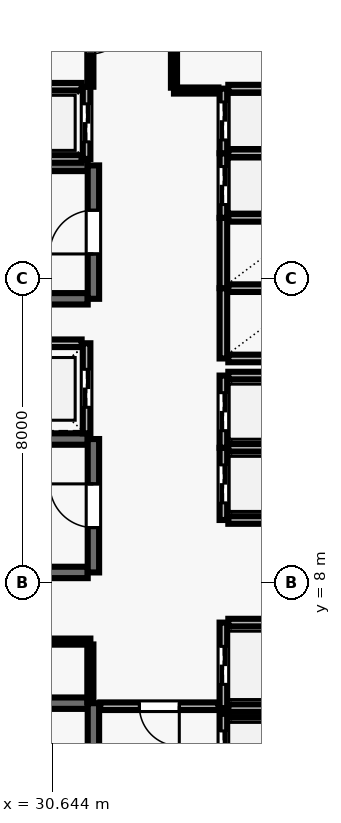
"""IFC4 building model, lengths in metres.
Left out: names, types, materials, properties, quantities, classifications, styles, units other than length and angle.
Written with IfcOpenShell. Run it as: python <this file> out.ifc"""

import sys

from ifc_helpers import new_model, si_unit, direction, frame, frame_2d, origin, place, context, subcontext, project, spatial, rectangle, extrude, element, fill, save


model = new_model("IFC4")
c1 = context("Model", 3, precision=1e-05, world=origin(), true_north=direction((0.0, 1.0)))
c2 = subcontext(c1, "Body", "Model", "MODEL_VIEW")
j1 = project(units=[si_unit("LENGTHUNIT", "METRE"), si_unit("PLANEANGLEUNIT", "RADIAN")], contexts=[c1])
p1 = place(None, origin())
s1 = spatial("IfcSite", under=j1, at=p1, CompositionType="ELEMENT")
p2 = place(p1, origin())
s2 = spatial("IfcBuilding", under=s1, at=p2, CompositionType="ELEMENT")
p3 = place(p2, frame((0.0, 0.0, 170.8)))
s3 = spatial("IfcBuildingStorey", under=s2, at=p3, CompositionType="ELEMENT", Elevation=170.8)
p4 = place(p3, frame((31.58, 4.83, 0.0), z_axis=(0.0, 0.0, 1.0), x_axis=(-1.0, 0.0, 0.0)))
e1 = element("IfcWall", 1, at=p4, inside=s3, PredefinedType="SHEAR", context=c2, shape_type="SweptSolid", body=[
    extrude(rectangle(XDim=8.36, YDim=0.3, at=frame_2d((4.18, 0.0))), origin(), (0.0, 0.0, 1.0), 4.79),
])
p5 = place(p3, frame((31.73, 0.96, 0.0), z_axis=(0.0, 0.0, 1.0), x_axis=(0.0, 1.0, 0.0)))
e2 = element("IfcWall", 2, at=p5, inside=s3, PredefinedType="SHEAR", context=c2, shape_type="SweptSolid", body=[
    extrude(rectangle(XDim=3.87, YDim=0.3, at=frame_2d((1.935, 0.0))), origin(), (0.0, 0.0, 1.0), 4.79),
])
p6 = place(p5, frame((1.54, 0.0, 0.0)))
e3 = element("IfcOpeningElement", 3, at=p6, cuts=e2, PredefinedType="OPENING", context=c2, shape_type="SweptSolid", body=[
    extrude(rectangle(XDim=1.15, YDim=2.15, at=frame_2d((0.575, 1.075))), frame((0.0, 0.16, 0.0), z_axis=(0.0, -1.0, 0.0), x_axis=(1.0, 0.0, 0.0)), (0.0, 0.0, 1.0), 0.32),
])
for number, where, z_axis, x_axis in (
    (4, (31.58, 18.98, 0.0), (0.0, 0.0, 1.0), (-1.0, 0.0, 0.0)),
    (5, (23.22, 15.47, 0.0), (0.0, 0.0, 1.0), (1.0, 0.0, 0.0)),
):
    element("IfcWall", number, at=place(p3, frame(where, z_axis=z_axis, x_axis=x_axis)), inside=s3, PredefinedType="SHEAR", context=c2, shape_type="SweptSolid", body=[
        extrude(rectangle(XDim=8.36, YDim=0.3, at=frame_2d((4.18, 0.0))), origin(), (0.0, 0.0, 1.0), 4.79),
    ])
p7 = place(p3, frame((31.73, 15.47, 0.0), z_axis=(0.0, 0.0, 1.0), x_axis=(0.0, 1.0, 0.0)))
e6 = element("IfcWall", 6, at=p7, inside=s3, PredefinedType="SHEAR", context=c2, shape_type="SweptSolid", body=[
    extrude(rectangle(XDim=3.51, YDim=0.3, at=frame_2d((1.755, 0.0))), origin(), (0.0, 0.0, 1.0), 4.79),
])
p8 = place(p7, frame((1.18, 0.0, 0.0)))
e7 = element("IfcOpeningElement", 7, at=p8, cuts=e6, PredefinedType="OPENING", context=c2, shape_type="SweptSolid", body=[
    extrude(rectangle(XDim=1.15, YDim=2.15, at=frame_2d((0.575, 1.075))), frame((0.0, 0.16, 0.0), z_axis=(0.0, -1.0, 0.0), x_axis=(1.0, 0.0, 0.0)), (0.0, 0.0, 1.0), 0.32),
])
for number, where, z_axis, x_axis in (
    (8, (31.58, 11.78, 0.0), (0.0, 0.0, 1.0), (-1.0, 0.0, 0.0)),
    (9, (23.22, 8.27, 0.0), (0.0, 0.0, 1.0), (1.0, 0.0, 0.0)),
):
    element("IfcWall", number, at=place(p3, frame(where, z_axis=z_axis, x_axis=x_axis)), inside=s3, PredefinedType="SHEAR", context=c2, shape_type="SweptSolid", body=[
        extrude(rectangle(XDim=8.36, YDim=0.3, at=frame_2d((4.18, 0.0))), origin(), (0.0, 0.0, 1.0), 4.79),
    ])
p9 = place(p3, frame((31.73, 8.27, 0.0), z_axis=(0.0, 0.0, 1.0), x_axis=(0.0, 1.0, 0.0)))
e10 = element("IfcWall", 10, at=p9, inside=s3, PredefinedType="SHEAR", context=c2, shape_type="SweptSolid", body=[
    extrude(rectangle(XDim=3.51, YDim=0.3, at=frame_2d((1.755, 0.0))), origin(), (0.0, 0.0, 1.0), 4.79),
])
p10 = place(p9, frame((1.18, 0.0, 0.0)))
e11 = element("IfcOpeningElement", 11, at=p10, cuts=e10, PredefinedType="OPENING", context=c2, shape_type="SweptSolid", body=[
    extrude(rectangle(XDim=1.15, YDim=2.15, at=frame_2d((0.575, 1.075))), frame((0.0, 0.16, 0.0), z_axis=(0.0, -1.0, 0.0), x_axis=(1.0, 0.0, 0.0)), (0.0, 0.0, 1.0), 0.32),
])
p11 = place(p3, frame((35.15, 4.55, 0.0), z_axis=(0.0, 0.0, 1.0), x_axis=(0.0, -1.0, 0.0)))
e12 = element("IfcWall", 12, at=p11, inside=s3, PredefinedType="SOLIDWALL", context=c2, shape_type="SweptSolid", body=[
    extrude(rectangle(XDim=2.1, YDim=0.2, at=frame_2d((1.05, 0.0))), origin(), (0.0, 0.0, 1.0), 4.79),
])
p12 = place(p11, frame((0.45, 0.0, 0.0)))
e13 = element("IfcOpeningElement", 13, at=p12, cuts=e12, PredefinedType="OPENING", context=c2, shape_type="SweptSolid", body=[
    extrude(rectangle(XDim=1.2, YDim=2.15, at=frame_2d((0.6, 1.075))), frame((0.0, 0.11, 0.0), z_axis=(0.0, -1.0, 0.0), x_axis=(1.0, 0.0, 0.0)), (0.0, 0.0, 1.0), 0.22),
])
p13 = place(p3, frame((37.42, 4.55, 0.0), z_axis=(0.0, 0.0, 1.0), x_axis=(-1.0, 0.0, 0.0)))
e14 = element("IfcWall", 14, at=p13, inside=s3, PredefinedType="SOLIDWALL", context=c2, shape_type="SweptSolid", body=[
    extrude(rectangle(XDim=2.14, YDim=0.2, at=frame_2d((1.07, 0.0))), origin(), (0.0, 0.0, 1.0), 4.79),
])
p14 = place(p3, frame((35.15, 6.95, 0.0), z_axis=(0.0, 0.0, 1.0), x_axis=(0.0, -1.0, 0.0)))
e15 = element("IfcWall", 15, at=p14, inside=s3, PredefinedType="SOLIDWALL", context=c2, shape_type="SweptSolid", body=[
    extrude(rectangle(XDim=2.25, YDim=0.2, at=frame_2d((1.125, 0.0))), origin(), (0.0, 0.0, 1.0), 4.79),
])
p15 = place(p14, frame((0.625, 0.0, 0.0)))
e16 = element("IfcOpeningElement", 16, at=p15, cuts=e15, PredefinedType="OPENING", context=c2, shape_type="SweptSolid", body=[
    extrude(rectangle(XDim=1.0, YDim=2.1, at=frame_2d((0.5, 1.05))), frame((0.0, 0.11, 0.0), z_axis=(0.0, -1.0, 0.0), x_axis=(1.0, 0.0, 0.0)), (0.0, 0.0, 1.0), 0.22),
])
for number, where, z_axis, x_axis in (
    (17, (35.28, 4.7, 0.0), (0.0, 0.0, 1.0), (1.0, 0.0, 0.0)),
    (18, (37.42, 6.95, 0.0), (0.0, 0.0, 1.0), (-1.0, 0.0, 0.0)),
):
    element("IfcWall", number, at=place(p3, frame(where, z_axis=z_axis, x_axis=x_axis)), inside=s3, PredefinedType="SOLIDWALL", context=c2, shape_type="SweptSolid", body=[
        extrude(rectangle(XDim=2.14, YDim=0.2, at=frame_2d((1.07, 0.0))), origin(), (0.0, 0.0, 1.0), 4.79),
    ])
p16 = place(p3, frame((35.15, 11.55, 0.0), z_axis=(0.0, 0.0, 1.0), x_axis=(0.0, -1.0, 0.0)))
e19 = element("IfcWall", 19, at=p16, inside=s3, PredefinedType="SOLIDWALL", context=c2, shape_type="SweptSolid", body=[
    extrude(rectangle(XDim=1.9, YDim=0.2, at=frame_2d((0.95, 0.0))), origin(), (0.0, 0.0, 1.0), 4.79),
])
p17 = place(p16, frame((0.45, 0.0, 0.0)))
e20 = element("IfcOpeningElement", 20, at=p17, cuts=e19, PredefinedType="OPENING", context=c2, shape_type="SweptSolid", body=[
    extrude(rectangle(XDim=1.0, YDim=2.1, at=frame_2d((0.5, 1.05))), frame((0.0, 0.11, 0.0), z_axis=(0.0, -1.0, 0.0), x_axis=(1.0, 0.0, 0.0)), (0.0, 0.0, 1.0), 0.22),
])
for number, where, z_axis, x_axis in (
    (21, (35.28, 9.65, 0.0), (0.0, 0.0, 1.0), (1.0, 0.0, 0.0)),
    (22, (37.42, 11.55, 0.0), (0.0, 0.0, 1.0), (-1.0, 0.0, 0.0)),
):
    element("IfcWall", number, at=place(p3, frame(where, z_axis=z_axis, x_axis=x_axis)), inside=s3, PredefinedType="SOLIDWALL", context=c2, shape_type="SweptSolid", body=[
        extrude(rectangle(XDim=2.14, YDim=0.2, at=frame_2d((1.07, 0.0))), origin(), (0.0, 0.0, 1.0), 4.79),
    ])
p18 = place(p3, frame((35.15, 13.45, 0.0), z_axis=(0.0, 0.0, 1.0), x_axis=(0.0, -1.0, 0.0)))
e23 = element("IfcWall", 23, at=p18, inside=s3, PredefinedType="SOLIDWALL", context=c2, shape_type="SweptSolid", body=[
    extrude(rectangle(XDim=1.9, YDim=0.2, at=frame_2d((0.95, 0.0))), origin(), (0.0, 0.0, 1.0), 4.79),
])
p19 = place(p18, frame((0.45, 0.0, 0.0)))
e24 = element("IfcOpeningElement", 24, at=p19, cuts=e23, PredefinedType="OPENING", context=c2, shape_type="SweptSolid", body=[
    extrude(rectangle(XDim=1.0, YDim=2.1, at=frame_2d((0.5, 1.05))), frame((0.0, 0.11, 0.0), z_axis=(0.0, -1.0, 0.0), x_axis=(1.0, 0.0, 0.0)), (0.0, 0.0, 1.0), 0.22),
])
p20 = place(p3, frame((37.42, 13.45, 0.0), z_axis=(0.0, 0.0, 1.0), x_axis=(-1.0, 0.0, 0.0)))
e25 = element("IfcWall", 25, at=p20, inside=s3, PredefinedType="SOLIDWALL", context=c2, shape_type="SweptSolid", body=[
    extrude(rectangle(XDim=2.14, YDim=0.2, at=frame_2d((1.07, 0.0))), origin(), (0.0, 0.0, 1.0), 4.79),
])
p21 = place(p3, frame((31.55, 11.93, 0.0), z_axis=(0.0, 0.0, 1.0), x_axis=(0.0, 1.0, 0.0)))
e26 = element("IfcWall", 26, at=p21, inside=s3, PredefinedType="SOLIDWALL", context=c2, shape_type="SweptSolid", body=[
    extrude(rectangle(XDim=2.37, YDim=0.2, at=frame_2d((1.185, 0.0))), origin(), (0.0, 0.0, 1.0), 4.79),
])
p22 = place(p21, frame((0.685, 0.0, 0.0)))
e27 = element("IfcOpeningElement", 27, at=p22, cuts=e26, PredefinedType="OPENING", context=c2, shape_type="SweptSolid", body=[
    extrude(rectangle(XDim=1.0, YDim=2.1, at=frame_2d((0.5, 1.05))), frame((0.0, 0.11, 0.0), z_axis=(0.0, -1.0, 0.0), x_axis=(1.0, 0.0, 0.0)), (0.0, 0.0, 1.0), 0.22),
])
p23 = place(p3, frame((31.42, 14.3, 0.0), z_axis=(0.0, 0.0, 1.0), x_axis=(-1.0, 0.0, 0.0)))
e28 = element("IfcWall", 28, at=p23, inside=s3, PredefinedType="SOLIDWALL", context=c2, shape_type="SweptSolid", body=[
    extrude(rectangle(XDim=2.44, YDim=0.2, at=frame_2d((1.22, 0.0))), origin(), (0.0, 0.0, 1.0), 4.79),
])
p24 = place(p3, frame((35.15, 15.75, 0.0), z_axis=(0.0, 0.0, 1.0), x_axis=(0.0, -1.0, 0.0)))
e29 = element("IfcWall", 29, at=p24, inside=s3, PredefinedType="SOLIDWALL", context=c2, shape_type="SweptSolid", body=[
    extrude(rectangle(XDim=1.85, YDim=0.2, at=frame_2d((0.925, 0.0))), origin(), (0.0, 0.0, 1.0), 4.79),
])
for number, where, z_axis, x_axis in (
    (30, (35.28, 13.9, 0.0), (0.0, 0.0, 1.0), (1.0, 0.0, 0.0)),
    (31, (37.42, 15.75, 0.0), (0.0, 0.0, 1.0), (-1.0, 0.0, 0.0)),
):
    element("IfcWall", number, at=place(p3, frame(where, z_axis=z_axis, x_axis=x_axis)), inside=s3, PredefinedType="SOLIDWALL", context=c2, shape_type="SweptSolid", body=[
        extrude(rectangle(XDim=2.14, YDim=0.2, at=frame_2d((1.07, 0.0))), origin(), (0.0, 0.0, 1.0), 4.79),
    ])
p25 = place(p3, frame((35.15, 17.6, 0.0), z_axis=(0.0, 0.0, 1.0), x_axis=(0.0, -1.0, 0.0)))
e32 = element("IfcWall", 32, at=p25, inside=s3, PredefinedType="SOLIDWALL", context=c2, shape_type="SweptSolid", body=[
    extrude(rectangle(XDim=1.85, YDim=0.2, at=frame_2d((0.925, 0.0))), origin(), (0.0, 0.0, 1.0), 4.79),
])
p26 = place(p3, frame((37.42, 17.6, 0.0), z_axis=(0.0, 0.0, 1.0), x_axis=(-1.0, 0.0, 0.0)))
e33 = element("IfcWall", 33, at=p26, inside=s3, PredefinedType="SOLIDWALL", context=c2, shape_type="SweptSolid", body=[
    extrude(rectangle(XDim=2.14, YDim=0.2, at=frame_2d((1.07, 0.0))), origin(), (0.0, 0.0, 1.0), 4.79),
])
p27 = place(p3, frame((35.15, 19.3, 0.0), z_axis=(0.0, 0.0, 1.0), x_axis=(0.0, -1.0, 0.0)))
e34 = element("IfcWall", 34, at=p27, inside=s3, PredefinedType="SOLIDWALL", context=c2, shape_type="SweptSolid", body=[
    extrude(rectangle(XDim=1.7, YDim=0.2, at=frame_2d((0.85, 0.0))), origin(), (0.0, 0.0, 1.0), 4.79),
])
p28 = place(p27, frame((0.35, 0.0, 0.0)))
e35 = element("IfcOpeningElement", 35, at=p28, cuts=e34, PredefinedType="OPENING", context=c2, shape_type="SweptSolid", body=[
    extrude(rectangle(XDim=1.0, YDim=2.1, at=frame_2d((0.5, 1.05))), frame((0.0, 0.11, 0.0), z_axis=(0.0, -1.0, 0.0), x_axis=(1.0, 0.0, 0.0)), (0.0, 0.0, 1.0), 0.22),
])
p29 = place(p3, frame((37.42, 19.3, 0.0), z_axis=(0.0, 0.0, 1.0), x_axis=(-1.0, 0.0, 0.0)))
e36 = element("IfcWall", 36, at=p29, inside=s3, PredefinedType="SOLIDWALL", context=c2, shape_type="SweptSolid", body=[
    extrude(rectangle(XDim=2.14, YDim=0.2, at=frame_2d((1.07, 0.0))), origin(), (0.0, 0.0, 1.0), 4.79),
])
p30 = place(p3, frame((35.15, 21.0, 0.0), z_axis=(0.0, 0.0, 1.0), x_axis=(0.0, -1.0, 0.0)))
e37 = element("IfcWall", 37, at=p30, inside=s3, PredefinedType="SOLIDWALL", context=c2, shape_type="SweptSolid", body=[
    extrude(rectangle(XDim=1.7, YDim=0.2, at=frame_2d((0.85, 0.0))), origin(), (0.0, 0.0, 1.0), 4.79),
])
p31 = place(p30, frame((0.35, 0.0, 0.0)))
e38 = element("IfcOpeningElement", 38, at=p31, cuts=e37, PredefinedType="OPENING", context=c2, shape_type="SweptSolid", body=[
    extrude(rectangle(XDim=1.0, YDim=2.1, at=frame_2d((0.5, 1.05))), frame((0.0, 0.11, 0.0), z_axis=(0.0, -1.0, 0.0), x_axis=(1.0, 0.0, 0.0)), (0.0, 0.0, 1.0), 0.22),
])
p32 = place(p3, frame((37.42, 21.0, 0.0), z_axis=(0.0, 0.0, 1.0), x_axis=(-1.0, 0.0, 0.0)))
e39 = element("IfcWall", 39, at=p32, inside=s3, PredefinedType="SOLIDWALL", context=c2, shape_type="SweptSolid", body=[
    extrude(rectangle(XDim=2.14, YDim=0.2, at=frame_2d((1.07, 0.0))), origin(), (0.0, 0.0, 1.0), 4.79),
])
p33 = place(p3, frame((31.55, 19.15, 0.0), z_axis=(0.0, 0.0, 1.0), x_axis=(0.0, 1.0, 0.0)))
e40 = element("IfcWall", 40, at=p33, inside=s3, PredefinedType="SOLIDWALL", context=c2, shape_type="SweptSolid", body=[
    extrude(rectangle(XDim=1.9, YDim=0.2, at=frame_2d((0.95, 0.0))), origin(), (0.0, 0.0, 1.0), 4.79),
])
p34 = place(p33, frame((0.45, 0.0, 0.0)))
e41 = element("IfcOpeningElement", 41, at=p34, cuts=e40, PredefinedType="OPENING", context=c2, shape_type="SweptSolid", body=[
    extrude(rectangle(XDim=1.0, YDim=2.1, at=frame_2d((0.5, 1.05))), frame((0.0, 0.11, 0.0), z_axis=(0.0, -1.0, 0.0), x_axis=(1.0, 0.0, 0.0)), (0.0, 0.0, 1.0), 0.22),
])
for number, where, z_axis, x_axis in (
    (42, (28.98, 19.15, 0.0), (0.0, 0.0, 1.0), (1.0, 0.0, 0.0)),
    (43, (31.42, 21.05, 0.0), (0.0, 0.0, 1.0), (-1.0, 0.0, 0.0)),
):
    element("IfcWall", number, at=place(p3, frame(where, z_axis=z_axis, x_axis=x_axis)), inside=s3, PredefinedType="SOLIDWALL", context=c2, shape_type="SweptSolid", body=[
        extrude(rectangle(XDim=2.44, YDim=0.2, at=frame_2d((1.22, 0.0))), origin(), (0.0, 0.0, 1.0), 4.79),
    ])
p35 = place(p3, frame((28.55, 6.45, 0.0), z_axis=(0.0, 0.0, 1.0), x_axis=(1.0, 0.0, 0.0)))
e44 = element("IfcWall", 44, at=p35, inside=s3, PredefinedType="PARTITIONING", context=c2, shape_type="SweptSolid", body=[
    extrude(rectangle(XDim=3.1, YDim=0.16, at=frame_2d((1.55, 0.0))), origin(), (0.0, 0.0, 1.0), 4.79),
])
p36 = place(p35, frame((1.11, 0.0, 0.0)))
e45 = element("IfcOpeningElement", 45, at=p36, cuts=e44, PredefinedType="OPENING", context=c2, shape_type="SweptSolid", body=[
    extrude(rectangle(XDim=0.88, YDim=2.1, at=frame_2d((0.44, 1.05))), frame((0.0, 0.09, 0.0), z_axis=(0.0, -1.0, 0.0), x_axis=(1.0, 0.0, 0.0)), (0.0, 0.0, 1.0), 0.18),
])
p37 = place(p3, frame((35.02, 4.75, 0.0), z_axis=(0.0, 0.0, 1.0), x_axis=(-1.0, 0.0, 0.0)))
e46 = element("IfcWall", 46, at=p37, inside=s3, PredefinedType="SOLIDWALL", context=c2, shape_type="SweptSolid", body=[
    extrude(rectangle(XDim=3.11, YDim=0.2, at=frame_2d((1.555, 0.0))), origin(), (0.0, 0.0, 1.0), 4.79),
])
p38 = place(p37, frame((1.03, 0.0, 0.0)))
e47 = element("IfcOpeningElement", 47, at=p38, cuts=e46, PredefinedType="OPENING", context=c2, shape_type="SweptSolid", body=[
    extrude(rectangle(XDim=1.05, YDim=2.15, at=frame_2d((0.525, 1.075))), frame((0.0, 0.11, 0.0), z_axis=(0.0, -1.0, 0.0), x_axis=(1.0, 0.0, 0.0)), (0.0, 0.0, 1.0), 0.22),
])
p39 = place(p3, frame((35.02, 20.95, 0.0), z_axis=(0.0, 0.0, 1.0), x_axis=(-1.0, 0.0, 0.0)))
e48 = element("IfcWall", 48, at=p39, inside=s3, PredefinedType="PARTITIONING", context=c2, shape_type="SweptSolid", body=[
    extrude(rectangle(XDim=1.17, YDim=0.16, at=frame_2d((0.585, 0.0))), origin(), (0.0, 0.0, 1.0), 4.79),
])
p40 = place(p3, frame((31.65, 4.86, 0.0), z_axis=(0.0, 0.0, 1.0), x_axis=(0.0, 1.0, 0.0)))
e49 = element("IfcWall", 49, at=p40, inside=s3, PredefinedType="PARTITIONING", context=c2, shape_type="SweptSolid", body=[
    extrude(rectangle(XDim=1.515, YDim=0.16, at=frame_2d((0.757, 0.0))), origin(), (0.0, 0.0, 1.0), 4.79),
])
p41 = place(p3, frame((31.65, 23.775, 0.0), z_axis=(0.0, 0.0, 1.0), x_axis=(0.0, -1.0, 0.0)))
e50 = element("IfcWall", 50, at=p41, inside=s3, PredefinedType="PARTITIONING", context=c2, shape_type="SweptSolid", body=[
    extrude(rectangle(XDim=2.725, YDim=0.16, at=frame_2d((1.362, 0.0))), origin(), (0.0, 0.0, 1.0), 4.79),
])
p42 = place(p41, frame((0.862, 0.0, 0.0)))
e51 = element("IfcOpeningElement", 51, at=p42, cuts=e50, PredefinedType="OPENING", context=c2, shape_type="SweptSolid", body=[
    extrude(rectangle(XDim=1.0, YDim=2.1, at=frame_2d((0.5, 1.05))), frame((0.0, 0.09, 0.0), z_axis=(0.0, -1.0, 0.0), x_axis=(1.0, 0.0, 0.0)), (0.0, 0.0, 1.0), 0.18),
])
p43 = place(p3, frame((33.85, 21.025, 0.0), z_axis=(0.0, 0.0, 1.0), x_axis=(0.0, 1.0, 0.0)))
e52 = element("IfcWall", 52, at=p43, inside=s3, PredefinedType="PARTITIONING", context=c2, shape_type="SweptSolid", body=[
    extrude(rectangle(XDim=2.75, YDim=0.16, at=frame_2d((1.375, 0.0))), origin(), (0.0, 0.0, 1.0), 4.79),
])
p44 = place(p8, origin())
e53 = element("IfcDoor", 53, at=p44, inside=s3, OperationType="SINGLE_SWING_LEFT", PredefinedType="DOOR", context=c2, shape_type="SweptSolid", body=[
    extrude(rectangle(XDim=1.15, YDim=2.15, at=frame_2d((0.575, 1.075))), frame((0.0, 0.025, 0.0), z_axis=(0.0, -1.0, 0.0), x_axis=(1.0, 0.0, 0.0)), (0.0, 0.0, 1.0), 0.05),
])
fill(e7, e53)
p45 = place(p10, origin())
e54 = element("IfcDoor", 54, at=p45, inside=s3, OperationType="SINGLE_SWING_RIGHT", PredefinedType="DOOR", context=c2, shape_type="SweptSolid", body=[
    extrude(rectangle(XDim=1.15, YDim=2.15, at=frame_2d((0.575, 1.075))), frame((0.0, 0.025, 0.0), z_axis=(0.0, -1.0, 0.0), x_axis=(1.0, 0.0, 0.0)), (0.0, 0.0, 1.0), 0.05),
])
fill(e11, e54)
p46 = place(p12, origin())
e55 = element("IfcDoor", 55, at=p46, inside=s3, OperationType="DOUBLE_DOOR_SLIDING", PredefinedType="DOOR", context=c2, shape_type="SweptSolid", body=[
    extrude(rectangle(XDim=1.2, YDim=2.15, at=frame_2d((0.6, 1.075))), frame((0.0, 0.025, 0.0), z_axis=(0.0, -1.0, 0.0), x_axis=(1.0, 0.0, 0.0)), (0.0, 0.0, 1.0), 0.05),
])
fill(e13, e55)
p47 = place(p15, origin())
e56 = element("IfcDoor", 56, at=p47, inside=s3, OperationType="DOUBLE_DOOR_SLIDING", PredefinedType="DOOR", context=c2, shape_type="SweptSolid", body=[
    extrude(rectangle(XDim=1.0, YDim=2.1, at=frame_2d((0.5, 1.05))), frame((0.0, 0.025, 0.0), z_axis=(0.0, -1.0, 0.0), x_axis=(1.0, 0.0, 0.0)), (0.0, 0.0, 1.0), 0.05),
])
fill(e16, e56)
p48 = place(p17, origin())
e57 = element("IfcDoor", 57, at=p48, inside=s3, OperationType="DOUBLE_DOOR_SLIDING", PredefinedType="DOOR", context=c2, shape_type="SweptSolid", body=[
    extrude(rectangle(XDim=1.0, YDim=2.1, at=frame_2d((0.5, 1.05))), frame((0.0, 0.025, 0.0), z_axis=(0.0, -1.0, 0.0), x_axis=(1.0, 0.0, 0.0)), (0.0, 0.0, 1.0), 0.05),
])
fill(e20, e57)
p49 = place(p19, origin())
e58 = element("IfcDoor", 58, at=p49, inside=s3, OperationType="DOUBLE_DOOR_SLIDING", PredefinedType="DOOR", context=c2, shape_type="SweptSolid", body=[
    extrude(rectangle(XDim=1.0, YDim=2.1, at=frame_2d((0.5, 1.05))), frame((0.0, 0.025, 0.0), z_axis=(0.0, -1.0, 0.0), x_axis=(1.0, 0.0, 0.0)), (0.0, 0.0, 1.0), 0.05),
])
fill(e24, e58)
p50 = place(p22, origin())
e59 = element("IfcDoor", 59, at=p50, inside=s3, OperationType="DOUBLE_DOOR_SLIDING", PredefinedType="DOOR", context=c2, shape_type="SweptSolid", body=[
    extrude(rectangle(XDim=1.0, YDim=2.1, at=frame_2d((0.5, 1.05))), frame((0.0, 0.025, 0.0), z_axis=(0.0, -1.0, 0.0), x_axis=(1.0, 0.0, 0.0)), (0.0, 0.0, 1.0), 0.05),
])
fill(e27, e59)
p51 = place(p28, origin())
e60 = element("IfcDoor", 60, at=p51, inside=s3, OperationType="DOUBLE_DOOR_SLIDING", PredefinedType="DOOR", context=c2, shape_type="SweptSolid", body=[
    extrude(rectangle(XDim=1.0, YDim=2.1, at=frame_2d((0.5, 1.05))), frame((0.0, 0.025, 0.0), z_axis=(0.0, -1.0, 0.0), x_axis=(1.0, 0.0, 0.0)), (0.0, 0.0, 1.0), 0.05),
])
fill(e35, e60)
p52 = place(p31, origin())
e61 = element("IfcDoor", 61, at=p52, inside=s3, OperationType="DOUBLE_DOOR_SLIDING", PredefinedType="DOOR", context=c2, shape_type="SweptSolid", body=[
    extrude(rectangle(XDim=1.0, YDim=2.1, at=frame_2d((0.5, 1.05))), frame((0.0, 0.025, 0.0), z_axis=(0.0, -1.0, 0.0), x_axis=(1.0, 0.0, 0.0)), (0.0, 0.0, 1.0), 0.05),
])
fill(e38, e61)
p53 = place(p34, origin())
e62 = element("IfcDoor", 62, at=p53, inside=s3, OperationType="DOUBLE_DOOR_SLIDING", PredefinedType="DOOR", context=c2, shape_type="SweptSolid", body=[
    extrude(rectangle(XDim=1.0, YDim=2.1, at=frame_2d((0.5, 1.05))), frame((0.0, 0.025, 0.0), z_axis=(0.0, -1.0, 0.0), x_axis=(1.0, 0.0, 0.0)), (0.0, 0.0, 1.0), 0.05),
])
fill(e41, e62)
p54 = place(p38, origin())
e63 = element("IfcDoor", 63, at=p54, inside=s3, OperationType="SINGLE_SWING_LEFT", PredefinedType="DOOR", context=c2, shape_type="SweptSolid", body=[
    extrude(rectangle(XDim=1.05, YDim=2.15, at=frame_2d((0.525, 1.075))), frame((0.0, 0.025, 0.0), z_axis=(0.0, -1.0, 0.0), x_axis=(1.0, 0.0, 0.0)), (0.0, 0.0, 1.0), 0.05),
])
fill(e47, e63)
p55 = place(p42, origin())
e64 = element("IfcDoor", 64, at=p55, inside=s3, OperationType="SINGLE_SWING_LEFT", PredefinedType="DOOR", context=c2, shape_type="SweptSolid", body=[
    extrude(rectangle(XDim=1.0, YDim=2.1, at=frame_2d((0.5, 1.05))), frame((0.0, 0.025, 0.0), z_axis=(0.0, -1.0, 0.0), x_axis=(1.0, 0.0, 0.0)), (0.0, 0.0, 1.0), 0.05),
])
fill(e51, e64)
save(model, sys.argv[1])
